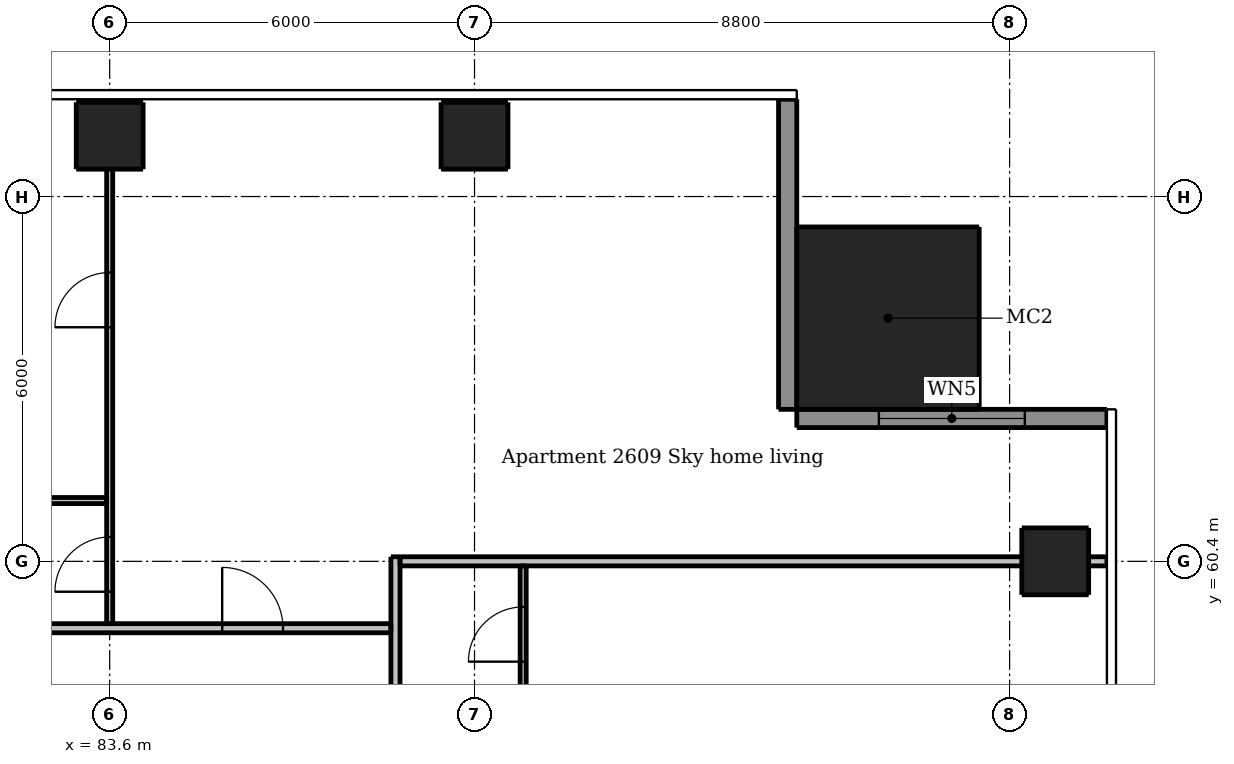
"""IFC4 building model, lengths in metres.
Left out: names, types, materials, properties, quantities, classifications, styles, units other than length and angle.
Written with IfcOpenShell. Run it as: python <this file> out.ifc"""

import sys

from ifc_helpers import new_model, si_unit, direction, frame, frame_2d, origin, origin_2d, place, context, subcontext, project, spatial, rectangle, extrude, element, fill, save


model = new_model("IFC4")
c1 = context("Model", 3, precision=1e-05, world=origin(), true_north=direction((0.0, 1.0)))
c2 = subcontext(c1, "Body", "Model", "MODEL_VIEW")
j1 = project(units=[si_unit("LENGTHUNIT", "METRE"), si_unit("PLANEANGLEUNIT", "RADIAN")], contexts=[c1])
p1 = place(None, origin())
s1 = spatial("IfcSite", under=j1, at=p1, CompositionType="ELEMENT")
p2 = place(p1, origin())
s2 = spatial("IfcBuilding", under=s1, at=p2, CompositionType="ELEMENT")
p3 = place(p2, frame((0.0, 0.0, 98.5)))
s3 = spatial("IfcBuildingStorey", under=s2, at=p3, CompositionType="ELEMENT", Elevation=98.5)
for number, where, z_axis, x_axis in (
    (1, (99.15, 60.4, 0.0), (0.0, 0.0, 1.0), (1.0, 0.0, 0.0)),
    (2, (83.6, 67.4, 0.0), (0.0, 0.0, 1.0), (1.0, 0.0, 0.0)),
    (3, (89.6, 67.4, 0.0), (0.0, 0.0, 1.0), (1.0, 0.0, 0.0)),
):
    element("IfcColumn", number, at=place(p3, frame(where, z_axis=z_axis, x_axis=x_axis)), inside=s3, PredefinedType="COLUMN", context=c2, shape_type="SweptSolid", body=[
        extrude(rectangle(XDim=1.1, YDim=1.1, at=origin_2d()), origin(), (0.0, 0.0, 1.0), 3.05),
    ])
p4 = place(p3, frame((96.4, 64.4, 0.0), z_axis=(0.0, 0.0, 1.0), x_axis=(1.0, 0.0, 0.0)))
e4 = element("IfcColumn", 4, at=p4, inside=s3, PredefinedType="COLUMN", context=c2, shape_type="SweptSolid", body=[
    extrude(rectangle(XDim=3.0, YDim=3.0, at=origin_2d()), origin(), (0.0, 0.0, 1.0), 3.3),
])
p5 = place(p3, frame((100.0, 62.75, 0.0), z_axis=(0.0, 0.0, 1.0), x_axis=(-1.0, 0.0, 0.0)))
e5 = element("IfcWall", 5, at=p5, inside=s3, PredefinedType="SOLIDWALL", context=c2, shape_type="SweptSolid", body=[
    extrude(rectangle(XDim=5.1, YDim=0.3, at=frame_2d((2.55, 0.0))), origin(), (0.0, 0.0, 1.0), 3.05),
])
p6 = place(p5, frame((1.35, 0.0, 0.15)))
e6 = element("IfcOpeningElement", 6, at=p6, cuts=e5, PredefinedType="OPENING", context=c2, shape_type="SweptSolid", body=[
    extrude(rectangle(XDim=2.4, YDim=2.1, at=frame_2d((1.2, 1.05))), frame((0.0, 0.16, 0.0), z_axis=(0.0, -1.0, 0.0), x_axis=(1.0, 0.0, 0.0)), (0.0, 0.0, 1.0), 0.32),
])
p7 = place(p3, frame((94.75, 62.9, 0.0), z_axis=(0.0, 0.0, 1.0), x_axis=(0.0, 1.0, 0.0)))
e7 = element("IfcWall", 7, at=p7, inside=s3, PredefinedType="SOLIDWALL", context=c2, shape_type="SweptSolid", body=[
    extrude(rectangle(XDim=5.1, YDim=0.3, at=frame_2d((2.55, 0.0))), origin(), (0.0, 0.0, 1.0), 3.05),
])
p8 = place(p3, frame((83.6, 59.375, 0.0), z_axis=(0.0, 0.0, 1.0), x_axis=(0.0, 1.0, 0.0)))
e8 = element("IfcWall", 8, at=p8, inside=s3, PredefinedType="PARTITIONING", context=c2, shape_type="SweptSolid", body=[
    extrude(rectangle(XDim=8.625, YDim=0.1, at=frame_2d((4.312, 0.0))), origin(), (0.0, 0.0, 1.0), 2.516),
])
p9 = place(p8, frame((0.525, 0.0, 0.0)))
e9 = element("IfcOpeningElement", 9, at=p9, cuts=e8, PredefinedType="OPENING", context=c2, shape_type="SweptSolid", body=[
    extrude(rectangle(XDim=0.9, YDim=2.1, at=frame_2d((0.45, 1.05))), frame((0.0, 0.06, 0.0), z_axis=(0.0, -1.0, 0.0), x_axis=(1.0, 0.0, 0.0)), (0.0, 0.0, 1.0), 0.12),
])
p10 = place(p8, frame((4.875, 0.0, 0.0)))
e10 = element("IfcOpeningElement", 10, at=p10, cuts=e8, PredefinedType="OPENING", context=c2, shape_type="SweptSolid", body=[
    extrude(rectangle(XDim=0.9, YDim=2.1, at=frame_2d((0.45, 1.05))), frame((0.0, 0.06, 0.0), z_axis=(0.0, -1.0, 0.0), x_axis=(1.0, 0.0, 0.0)), (0.0, 0.0, 1.0), 0.12),
])
p11 = place(p3, frame((90.4, 57.95, 0.0), z_axis=(0.0, 0.0, 1.0), x_axis=(0.0, 1.0, 0.0)))
e11 = element("IfcWall", 11, at=p11, inside=s3, PredefinedType="PARTITIONING", context=c2, shape_type="SweptSolid", body=[
    extrude(rectangle(XDim=2.375, YDim=0.1, at=frame_2d((1.188, 0.0))), origin(), (0.0, 0.0, 1.0), 3.05),
])
p12 = place(p11, frame((0.8, 0.0, 0.0)))
e12 = element("IfcOpeningElement", 12, at=p12, cuts=e11, PredefinedType="OPENING", context=c2, shape_type="SweptSolid", body=[
    extrude(rectangle(XDim=0.9, YDim=2.1, at=frame_2d((0.45, 1.05))), frame((0.0, 0.06, 0.0), z_axis=(0.0, -1.0, 0.0), x_axis=(1.0, 0.0, 0.0)), (0.0, 0.0, 1.0), 0.12),
])
p13 = place(p3, frame((83.55, 61.4, 0.0), z_axis=(0.0, 0.0, 1.0), x_axis=(-1.0, 0.0, 0.0)))
e13 = element("IfcWall", 13, at=p13, inside=s3, PredefinedType="PARTITIONING", context=c2, shape_type="SweptSolid", body=[
    extrude(rectangle(XDim=5.875, YDim=0.1, at=frame_2d((2.938, 0.0))), origin(), (0.0, 0.0, 1.0), 3.05),
])
p14 = place(p13, frame((3.75, 0.0, 0.0)))
e14 = element("IfcOpeningElement", 14, at=p14, cuts=e13, PredefinedType="OPENING", context=c2, shape_type="SweptSolid", body=[
    extrude(rectangle(XDim=0.8, YDim=2.1, at=frame_2d((0.4, 1.05))), frame((0.0, 0.06, 0.0), z_axis=(0.0, -1.0, 0.0), x_axis=(1.0, 0.0, 0.0)), (0.0, 0.0, 1.0), 0.12),
])
p15 = place(p3, frame((88.3, 60.475, 0.0), z_axis=(0.0, 0.0, 1.0), x_axis=(0.0, -1.0, 0.0)))
e15 = element("IfcWall", 15, at=p15, inside=s3, PredefinedType="PARTITIONING", context=c2, shape_type="SweptSolid", body=[
    extrude(rectangle(XDim=28.7, YDim=0.15, at=frame_2d((14.35, 0.0))), origin(), (0.0, 0.0, 1.0), 3.05),
])
p16 = place(p15, frame((27.425, 0.0, 0.0)))
e16 = element("IfcOpeningElement", 16, at=p16, cuts=e15, PredefinedType="OPENING", context=c2, shape_type="SweptSolid", body=[
    extrude(rectangle(XDim=1.0, YDim=2.1, at=frame_2d((0.5, 1.05))), frame((0.0, 0.085, 0.0), z_axis=(0.0, -1.0, 0.0), x_axis=(1.0, 0.0, 0.0)), (0.0, 0.0, 1.0), 0.17),
])
p17 = place(p15, frame((14.575, 0.0, 0.0)))
e17 = element("IfcOpeningElement", 17, at=p17, cuts=e15, PredefinedType="OPENING", context=c2, shape_type="SweptSolid", body=[
    extrude(rectangle(XDim=1.0, YDim=2.1, at=frame_2d((0.5, 1.05))), frame((0.0, 0.085, 0.0), z_axis=(0.0, -1.0, 0.0), x_axis=(1.0, 0.0, 0.0)), (0.0, 0.0, 1.0), 0.17),
])
p18 = place(p15, frame((3.775, 0.0, 0.0)))
e18 = element("IfcOpeningElement", 18, at=p18, cuts=e15, PredefinedType="OPENING", context=c2, shape_type="SweptSolid", body=[
    extrude(rectangle(XDim=1.0, YDim=2.1, at=frame_2d((0.5, 1.05))), frame((0.0, 0.085, 0.0), z_axis=(0.0, -1.0, 0.0), x_axis=(1.0, 0.0, 0.0)), (0.0, 0.0, 1.0), 0.17),
])
p19 = place(p3, frame((88.375, 60.4, 0.0), z_axis=(0.0, 0.0, 1.0), x_axis=(1.0, 0.0, 0.0)))
e19 = element("IfcWall", 19, at=p19, inside=s3, PredefinedType="PARTITIONING", context=c2, shape_type="SweptSolid", body=[
    extrude(rectangle(XDim=11.625, YDim=0.15, at=frame_2d((5.812, 0.0))), origin(), (0.0, 0.0, 1.0), 2.516),
])
p20 = place(p3, frame((59.675, 59.3, 0.0), z_axis=(0.0, 0.0, 1.0), x_axis=(1.0, 0.0, 0.0)))
e20 = element("IfcWall", 20, at=p20, inside=s3, PredefinedType="PARTITIONING", context=c2, shape_type="SweptSolid", body=[
    extrude(rectangle(XDim=28.55, YDim=0.15, at=frame_2d((14.275, 0.0))), origin(), (0.0, 0.0, 1.0), 3.05),
])
p21 = place(p20, frame((3.625, 0.0, 0.0)))
e21 = element("IfcOpeningElement", 21, at=p21, cuts=e20, PredefinedType="OPENING", context=c2, shape_type="SweptSolid", body=[
    extrude(rectangle(XDim=1.0, YDim=2.1, at=frame_2d((0.5, 1.05))), frame((0.0, 0.085, 0.0), z_axis=(0.0, -1.0, 0.0), x_axis=(1.0, 0.0, 0.0)), (0.0, 0.0, 1.0), 0.17),
])
p22 = place(p20, frame((14.425, 0.0, 0.0)))
e22 = element("IfcOpeningElement", 22, at=p22, cuts=e20, PredefinedType="OPENING", context=c2, shape_type="SweptSolid", body=[
    extrude(rectangle(XDim=1.0, YDim=2.1, at=frame_2d((0.5, 1.05))), frame((0.0, 0.085, 0.0), z_axis=(0.0, -1.0, 0.0), x_axis=(1.0, 0.0, 0.0)), (0.0, 0.0, 1.0), 0.17),
])
p23 = place(p20, frame((25.775, 0.0, 0.0)))
e23 = element("IfcOpeningElement", 23, at=p23, cuts=e20, PredefinedType="OPENING", context=c2, shape_type="SweptSolid", body=[
    extrude(rectangle(XDim=1.0, YDim=2.1, at=frame_2d((0.5, 1.05))), frame((0.0, 0.085, 0.0), z_axis=(0.0, -1.0, 0.0), x_axis=(1.0, 0.0, 0.0)), (0.0, 0.0, 1.0), 0.17),
])
p24 = place(p6, origin())
e24 = element("IfcWindow", 24, at=p24, inside=s3, PartitioningType="DOUBLE_PANEL_VERTICAL", PredefinedType="WINDOW", context=c2, shape_type="SweptSolid", body=[
    extrude(rectangle(XDim=2.4, YDim=2.1, at=frame_2d((1.2, 1.05))), frame((0.0, 0.03, 0.0), z_axis=(0.0, -1.0, 0.0), x_axis=(1.0, 0.0, 0.0)), (0.0, 0.0, 1.0), 0.06),
])
fill(e6, e24)
p25 = place(p12, origin())
e25 = element("IfcDoor", 25, at=p25, inside=s3, OperationType="SINGLE_SWING_LEFT", PredefinedType="DOOR", context=c2, shape_type="SweptSolid", body=[
    extrude(rectangle(XDim=0.9, YDim=2.1, at=frame_2d((0.45, 1.05))), frame((0.0, 0.025, 0.0), z_axis=(0.0, -1.0, 0.0), x_axis=(1.0, 0.0, 0.0)), (0.0, 0.0, 1.0), 0.05),
])
fill(e12, e25)
p26 = place(p23, origin())
e26 = element("IfcDoor", 26, at=p26, inside=s3, OperationType="SINGLE_SWING_LEFT", PredefinedType="DOOR", context=c2, shape_type="SweptSolid", body=[
    extrude(rectangle(XDim=1.0, YDim=2.1, at=frame_2d((0.5, 1.05))), frame((0.0, 0.025, 0.0), z_axis=(0.0, -1.0, 0.0), x_axis=(1.0, 0.0, 0.0)), (0.0, 0.0, 1.0), 0.05),
])
fill(e23, e26)
p27 = place(p9, origin())
e27 = element("IfcDoor", 27, at=p27, inside=s3, OperationType="SINGLE_SWING_LEFT", PredefinedType="DOOR", context=c2, shape_type="SweptSolid", body=[
    extrude(rectangle(XDim=0.9, YDim=2.1, at=frame_2d((0.45, 1.05))), frame((0.0, 0.025, 0.0), z_axis=(0.0, -1.0, 0.0), x_axis=(1.0, 0.0, 0.0)), (0.0, 0.0, 1.0), 0.05),
])
fill(e9, e27)
p28 = place(p10, origin())
e28 = element("IfcDoor", 28, at=p28, inside=s3, OperationType="SINGLE_SWING_LEFT", PredefinedType="DOOR", context=c2, shape_type="SweptSolid", body=[
    extrude(rectangle(XDim=0.9, YDim=2.1, at=frame_2d((0.45, 1.05))), frame((0.0, 0.025, 0.0), z_axis=(0.0, -1.0, 0.0), x_axis=(1.0, 0.0, 0.0)), (0.0, 0.0, 1.0), 0.05),
])
fill(e10, e28)
save(model, sys.argv[1])
